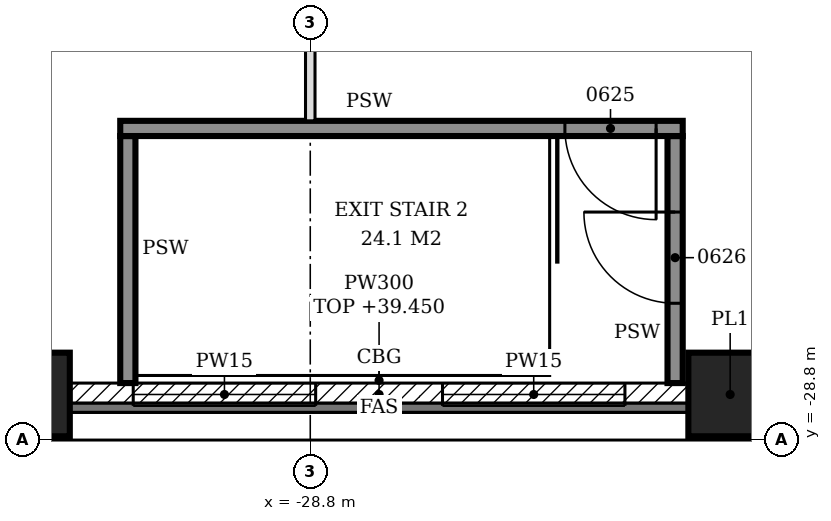
"""IFC4 building model, lengths in metres.
Left out: names, types, materials, properties, quantities, classifications, styles, units other than length and angle.
Written with IfcOpenShell. Run it as: python <this file> out.ifc"""

import sys

from ifc_helpers import new_model, si_unit, direction, frame, frame_2d, origin, origin_2d, place, context, subcontext, project, spatial, polyline, rectangle, hollow_rectangle, outline, extrude, element, fill, save


model = new_model("IFC4")
c1 = context("Model", 3, precision=1e-05, world=origin(), true_north=direction((0.0, 1.0)))
c2 = subcontext(c1, "Body", "Model", "MODEL_VIEW")
j1 = project(units=[si_unit("LENGTHUNIT", "METRE"), si_unit("PLANEANGLEUNIT", "RADIAN")], contexts=[c1])
p1 = place(None, origin())
s1 = spatial("IfcSite", under=j1, at=p1, CompositionType="ELEMENT")
p2 = place(p1, origin())
s2 = spatial("IfcBuilding", under=s1, at=p2, CompositionType="ELEMENT")
p3 = place(p2, frame((0.0, 0.0, 35.4)))
s3 = spatial("IfcBuildingStorey", under=s2, at=p3, CompositionType="ELEMENT", Elevation=35.4)
for number, where, z_axis, x_axis in (
    (1, (-32.514, -28.2, 0.0), (0.0, 0.0, 1.0), (1.0, 0.0, 0.0)),
    (2, (-23.276, -28.2, 0.0), (0.0, 0.0, 1.0), (1.0, 0.0, 0.0)),
):
    element("IfcColumn", number, at=place(p3, frame(where, z_axis=z_axis, x_axis=x_axis)), inside=s3, PredefinedType="COLUMN", context=c2, shape_type="SweptSolid", body=[
        extrude(hollow_rectangle(XDim=1.1, YDim=1.1, WallThickness=0.06, at=origin_2d()), origin(), (0.0, 0.0, 1.0), 4.65),
    ])
p4 = place(p3, frame((-31.964, -28.2, 0.0), z_axis=(0.0, 0.0, 1.0), x_axis=(1.0, 0.0, 0.0)))
e3 = element("IfcWall", 3, at=p4, inside=s3, PredefinedType="SOLIDWALL", context=c2, shape_type="SweptSolid", body=[
    extrude(rectangle(XDim=8.138, YDim=0.3, at=frame_2d((4.069, 0.0))), origin(), (0.0, 0.0, 1.0), 4.05),
])
p5 = place(p4, frame((0.834, 0.0, 0.9)))
e4 = element("IfcOpeningElement", 4, at=p5, cuts=e3, PredefinedType="OPENING", context=c2, shape_type="SweptSolid", body=[
    extrude(rectangle(XDim=2.4, YDim=1.5, at=frame_2d((1.2, 0.75))), frame((0.0, 0.16, 0.0), z_axis=(0.0, -1.0, 0.0), x_axis=(1.0, 0.0, 0.0)), (0.0, 0.0, 1.0), 0.32),
])
p6 = place(p4, frame((4.903, 0.0, 0.9)))
e5 = element("IfcOpeningElement", 5, at=p6, cuts=e3, PredefinedType="OPENING", context=c2, shape_type="SweptSolid", body=[
    extrude(rectangle(XDim=2.4, YDim=1.5, at=frame_2d((1.2, 0.75))), frame((0.0, 0.16, 0.0), z_axis=(0.0, -1.0, 0.0), x_axis=(1.0, 0.0, 0.0)), (0.0, 0.0, 1.0), 0.32),
])
p7 = place(p3, frame((-31.2, -28.05, 0.0), z_axis=(0.0, 0.0, 1.0), x_axis=(0.0, 1.0, 0.0)))
e6 = element("IfcWall", 6, at=p7, inside=s3, PredefinedType="SOLIDWALL", context=c2, shape_type="SweptSolid", body=[
    extrude(rectangle(XDim=3.25, YDim=0.2, at=frame_2d((1.625, 0.0))), origin(), (0.0, 0.0, 1.0), 4.65),
])
p8 = place(p3, frame((-24.0, -28.05, 0.0), z_axis=(0.0, 0.0, 1.0), x_axis=(0.0, 1.0, 0.0)))
e7 = element("IfcWall", 7, at=p8, inside=s3, PredefinedType="SOLIDWALL", context=c2, shape_type="SweptSolid", body=[
    extrude(rectangle(XDim=3.25, YDim=0.2, at=frame_2d((1.625, 0.0))), origin(), (0.0, 0.0, 1.0), 4.65),
])
p9 = place(p8, frame((1.05, 0.0, 0.0)))
e8 = element("IfcOpeningElement", 8, at=p9, cuts=e7, PredefinedType="OPENING", context=c2, shape_type="SweptSolid", body=[
    extrude(rectangle(XDim=1.2, YDim=2.1, at=frame_2d((0.6, 1.05))), frame((0.0, 0.11, 0.0), z_axis=(0.0, -1.0, 0.0), x_axis=(1.0, 0.0, 0.0)), (0.0, 0.0, 1.0), 0.22),
])
p10 = place(p3, frame((-31.3, -24.7, 0.0), z_axis=(0.0, 0.0, 1.0), x_axis=(1.0, 0.0, 0.0)))
e9 = element("IfcWall", 9, at=p10, inside=s3, PredefinedType="SOLIDWALL", context=c2, shape_type="SweptSolid", body=[
    extrude(rectangle(XDim=7.4, YDim=0.2, at=frame_2d((3.7, 0.0))), origin(), (0.0, 0.0, 1.0), 4.65),
])
p11 = place(p10, frame((5.85, 0.0, 0.0)))
e10 = element("IfcOpeningElement", 10, at=p11, cuts=e9, PredefinedType="OPENING", context=c2, shape_type="SweptSolid", body=[
    extrude(rectangle(XDim=1.2, YDim=2.1, at=frame_2d((0.6, 1.05))), frame((0.0, 0.11, 0.0), z_axis=(0.0, -1.0, 0.0), x_axis=(1.0, 0.0, 0.0)), (0.0, 0.0, 1.0), 0.22),
])
p12 = place(p3, frame((-28.8, -24.6, 0.0), z_axis=(0.0, 0.0, 1.0), x_axis=(0.0, 1.0, 0.0)))
e11 = element("IfcWall", 11, at=p12, inside=s3, PredefinedType="PARTITIONING", context=c2, shape_type="SweptSolid", body=[
    extrude(outline(polyline([(0.0, 0.0), (49.2, 0.0), (49.2, 4.65), (43.95, 4.65), (43.948, 4.03), (43.65, 4.03), (43.648, 4.65), (39.15, 4.65), (39.148, 4.03), (38.85, 4.03), (38.848, 4.65), (34.35, 4.65), (34.348, 4.03), (34.05, 4.03), (34.048, 4.65), (29.55, 4.65), (29.548, 4.03), (29.25, 4.03), (29.248, 4.65), (24.75, 4.65), (24.748, 4.03), (24.45, 4.03), (24.448, 4.65), (19.95, 4.65), (19.948, 4.03), (19.65, 4.03), (19.648, 4.65), (15.15, 4.65), (15.148, 4.03), (14.85, 4.03), (14.848, 4.65), (10.35, 4.65), (10.348, 4.03), (10.05, 4.03), (10.048, 4.65), (5.55, 4.65), (5.548, 4.03), (5.25, 4.03), (5.248, 4.65), (0.0, 4.65), (0.0, 0.0)])), frame((0.0, 0.062, 0.0), z_axis=(0.0, -1.0, 0.0), x_axis=(1.0, 0.0, 0.0)), (0.0, 0.0, 1.0), 0.125),
])
p13 = place(p12, frame((1.7, 0.0, 0.0)))
e12 = element("IfcOpeningElement", 12, at=p13, cuts=e11, PredefinedType="OPENING", context=c2, shape_type="SweptSolid", body=[
    extrude(rectangle(XDim=1.8, YDim=2.1, at=frame_2d((0.9, 1.05))), frame((0.0, 0.073, 0.0), z_axis=(0.0, -1.0, 0.0), x_axis=(1.0, 0.0, 0.0)), (0.0, 0.0, 1.0), 0.145),
])
p14 = place(p12, frame((8.05, 0.0, 0.0)))
e13 = element("IfcOpeningElement", 13, at=p14, cuts=e11, PredefinedType="OPENING", context=c2, shape_type="SweptSolid", body=[
    extrude(rectangle(XDim=1.8, YDim=2.1, at=frame_2d((0.9, 1.05))), frame((0.0, 0.073, 0.0), z_axis=(0.0, -1.0, 0.0), x_axis=(1.0, 0.0, 0.0)), (0.0, 0.0, 1.0), 0.145),
])
p15 = place(p12, frame((14.7, 0.0, 0.0)))
e14 = element("IfcOpeningElement", 14, at=p15, cuts=e11, PredefinedType="OPENING", context=c2, shape_type="SweptSolid", body=[
    extrude(rectangle(XDim=1.8, YDim=2.1, at=frame_2d((0.9, 1.05))), frame((0.0, 0.073, 0.0), z_axis=(0.0, -1.0, 0.0), x_axis=(1.0, 0.0, 0.0)), (0.0, 0.0, 1.0), 0.145),
])
p16 = place(p12, frame((21.2, 0.0, 0.0)))
e15 = element("IfcOpeningElement", 15, at=p16, cuts=e11, PredefinedType="OPENING", context=c2, shape_type="SweptSolid", body=[
    extrude(rectangle(XDim=1.8, YDim=2.1, at=frame_2d((0.9, 1.05))), frame((0.0, 0.073, 0.0), z_axis=(0.0, -1.0, 0.0), x_axis=(1.0, 0.0, 0.0)), (0.0, 0.0, 1.0), 0.145),
])
p17 = place(p12, frame((26.2, 0.0, 0.0)))
e16 = element("IfcOpeningElement", 16, at=p17, cuts=e11, PredefinedType="OPENING", context=c2, shape_type="SweptSolid", body=[
    extrude(rectangle(XDim=1.8, YDim=2.1, at=frame_2d((0.9, 1.05))), frame((0.0, 0.073, 0.0), z_axis=(0.0, -1.0, 0.0), x_axis=(1.0, 0.0, 0.0)), (0.0, 0.0, 1.0), 0.145),
])
p18 = place(p12, frame((32.7, 0.0, 0.0)))
e17 = element("IfcOpeningElement", 17, at=p18, cuts=e11, PredefinedType="OPENING", context=c2, shape_type="SweptSolid", body=[
    extrude(rectangle(XDim=1.8, YDim=2.1, at=frame_2d((0.9, 1.05))), frame((0.0, 0.073, 0.0), z_axis=(0.0, -1.0, 0.0), x_axis=(1.0, 0.0, 0.0)), (0.0, 0.0, 1.0), 0.145),
])
p19 = place(p12, frame((39.35, 0.0, 0.0)))
e18 = element("IfcOpeningElement", 18, at=p19, cuts=e11, PredefinedType="OPENING", context=c2, shape_type="SweptSolid", body=[
    extrude(rectangle(XDim=1.8, YDim=2.1, at=frame_2d((0.9, 1.05))), frame((0.0, 0.073, 0.0), z_axis=(0.0, -1.0, 0.0), x_axis=(1.0, 0.0, 0.0)), (0.0, 0.0, 1.0), 0.145),
])
p20 = place(p12, frame((45.7, 0.0, 0.0)))
e19 = element("IfcOpeningElement", 19, at=p20, cuts=e11, PredefinedType="OPENING", context=c2, shape_type="SweptSolid", body=[
    extrude(rectangle(XDim=1.8, YDim=2.1, at=frame_2d((0.9, 1.05))), frame((0.0, 0.073, 0.0), z_axis=(0.0, -1.0, 0.0), x_axis=(1.0, 0.0, 0.0)), (0.0, 0.0, 1.0), 0.145),
])
p21 = place(p5, origin())
e20 = element("IfcWindow", 20, at=p21, inside=s3, PartitioningType="SINGLE_PANEL", PredefinedType="WINDOW", context=c2, shape_type="SweptSolid", body=[
    extrude(rectangle(XDim=2.4, YDim=1.5, at=frame_2d((1.2, 0.75))), frame((0.0, 0.03, 0.0), z_axis=(0.0, -1.0, 0.0), x_axis=(1.0, 0.0, 0.0)), (0.0, 0.0, 1.0), 0.06),
])
fill(e4, e20)
p22 = place(p6, origin())
e21 = element("IfcWindow", 21, at=p22, inside=s3, PartitioningType="SINGLE_PANEL", PredefinedType="WINDOW", context=c2, shape_type="SweptSolid", body=[
    extrude(rectangle(XDim=2.4, YDim=1.5, at=frame_2d((1.2, 0.75))), frame((0.0, 0.03, 0.0), z_axis=(0.0, -1.0, 0.0), x_axis=(1.0, 0.0, 0.0)), (0.0, 0.0, 1.0), 0.06),
])
fill(e5, e21)
p23 = place(p11, frame((1.2, 0.0, 0.0), z_axis=(0.0, 0.0, 1.0), x_axis=(-1.0, 0.0, 0.0)))
e22 = element("IfcDoor", 22, at=p23, inside=s3, OperationType="SINGLE_SWING_LEFT", PredefinedType="DOOR", context=c2, shape_type="SweptSolid", body=[
    extrude(rectangle(XDim=1.2, YDim=2.1, at=frame_2d((0.6, 1.05))), frame((0.0, 0.025, 0.0), z_axis=(0.0, -1.0, 0.0), x_axis=(1.0, 0.0, 0.0)), (0.0, 0.0, 1.0), 0.05),
])
fill(e10, e22)
p24 = place(p9, origin())
e23 = element("IfcDoor", 23, at=p24, inside=s3, OperationType="SINGLE_SWING_RIGHT", PredefinedType="DOOR", context=c2, shape_type="SweptSolid", body=[
    extrude(rectangle(XDim=1.2, YDim=2.1, at=frame_2d((0.6, 1.05))), frame((0.0, 0.025, 0.0), z_axis=(0.0, -1.0, 0.0), x_axis=(1.0, 0.0, 0.0)), (0.0, 0.0, 1.0), 0.05),
])
fill(e8, e23)
save(model, sys.argv[1])
